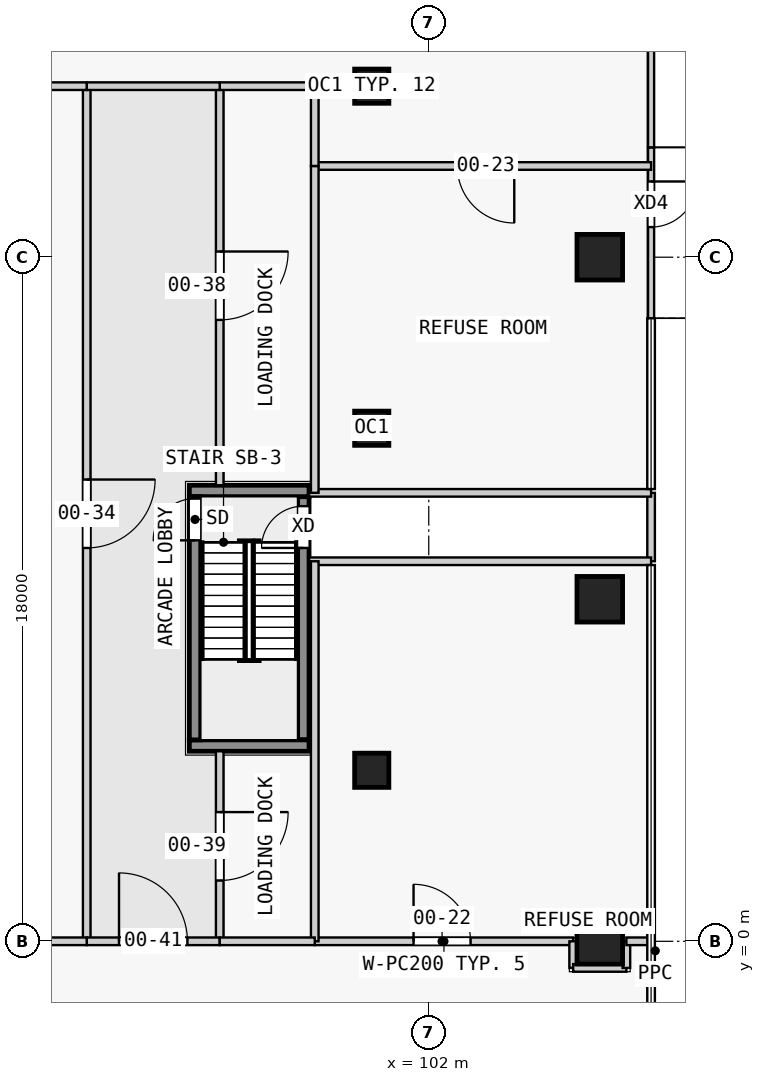
"""IFC4 building model, lengths in metres.
Left out: names, types, materials, properties, quantities, classifications, styles, units other than length and angle.
Written with IfcOpenShell. Run it as: python <this file> out.ifc"""

import sys

from ifc_helpers import new_model, si_unit, direction, frame, frame_2d, origin, origin_2d, place, context, subcontext, project, spatial, rectangle, extrude, element, fill, save


model = new_model("IFC4")
c1 = context("Model", 3, precision=1e-05, world=origin(), true_north=direction((0.0, 1.0)))
c2 = subcontext(c1, "Body", "Model", "MODEL_VIEW")
j1 = project(units=[si_unit("LENGTHUNIT", "METRE"), si_unit("PLANEANGLEUNIT", "RADIAN")], contexts=[c1])
p1 = place(None, origin())
s1 = spatial("IfcSite", under=j1, at=p1, CompositionType="ELEMENT")
p2 = place(p1, origin())
s2 = spatial("IfcBuilding", under=s1, at=p2, CompositionType="ELEMENT")
p3 = place(p2, origin())
s3 = spatial("IfcBuildingStorey", under=s2, at=p3, CompositionType="ELEMENT", Elevation=0.0)
for number, where, z_axis, x_axis in (
    (1, (106.5, 0.0, 0.0), (0.0, 0.0, 1.0), (1.0, 0.0, 0.0)),
    (2, (106.5, 9.0, 0.0), (0.0, 0.0, 1.0), (1.0, 0.0, 0.0)),
    (3, (106.5, 18.0, 0.0), (0.0, 0.0, 1.0), (1.0, 0.0, 0.0)),
):
    element("IfcColumn", number, at=place(p3, frame(where, z_axis=z_axis, x_axis=x_axis)), inside=s3, PredefinedType="COLUMN", context=c2, shape_type="SweptSolid", body=[
        extrude(rectangle(XDim=1.2, YDim=1.2, at=origin_2d()), origin(), (0.0, 0.0, 1.0), 8.0),
    ])
for number, where, z_axis, x_axis in (
    (4, (100.5, 4.5, 0.0), (0.0, 0.0, 1.0), (1.0, 0.0, 0.0)),
    (5, (100.5, 13.5, 0.0), (0.0, 0.0, 1.0), (1.0, 0.0, 0.0)),
    (6, (100.5, 22.5, 0.0), (0.0, 0.0, 1.0), (1.0, 0.0, 0.0)),
):
    element("IfcColumn", number, at=place(p3, frame(where, z_axis=z_axis, x_axis=x_axis)), inside=s3, PredefinedType="COLUMN", context=c2, shape_type="SweptSolid", body=[
        extrude(rectangle(XDim=0.9, YDim=0.9, at=origin_2d()), origin(), (0.0, 0.0, 1.0), 8.0),
    ])
p4 = place(p3, frame((95.85, 5.3, 0.0), z_axis=(0.0, 0.0, 1.0), x_axis=(0.0, 1.0, 0.0)))
e7 = element("IfcWall", 7, at=p4, inside=s3, PredefinedType="SHEAR", context=c2, shape_type="SweptSolid", body=[
    extrude(rectangle(XDim=6.4, YDim=0.3, at=frame_2d((3.2, 0.0))), origin(), (0.0, 0.0, 1.0), 7.65),
])
p5 = place(p4, frame((5.25, 0.0, 0.0)))
e8 = element("IfcOpeningElement", 8, at=p5, cuts=e7, PredefinedType="OPENING", context=c2, shape_type="SweptSolid", body=[
    extrude(rectangle(XDim=1.1, YDim=2.1, at=frame_2d((0.55, 1.05))), frame((0.0, 0.16, 0.0), z_axis=(0.0, -1.0, 0.0), x_axis=(1.0, 0.0, 0.0)), (0.0, 0.0, 1.0), 0.32),
])
p6 = place(p3, frame((98.7, 5.3, 0.0), z_axis=(0.0, 0.0, 1.0), x_axis=(0.0, 1.0, 0.0)))
e9 = element("IfcWall", 9, at=p6, inside=s3, PredefinedType="SHEAR", context=c2, shape_type="SweptSolid", body=[
    extrude(rectangle(XDim=6.4, YDim=0.3, at=frame_2d((3.2, 0.0))), origin(), (0.0, 0.0, 1.0), 7.65),
])
p7 = place(p6, frame((5.05, 0.0, 0.0)))
e10 = element("IfcOpeningElement", 10, at=p7, cuts=e9, PredefinedType="OPENING", context=c2, shape_type="SweptSolid", body=[
    extrude(rectangle(XDim=1.1, YDim=2.1, at=frame_2d((0.55, 1.05))), frame((0.0, 0.16, 0.0), z_axis=(0.0, -1.0, 0.0), x_axis=(1.0, 0.0, 0.0)), (0.0, 0.0, 1.0), 0.32),
])
for number, where, z_axis, x_axis in (
    (11, (95.7, 5.15, 0.0), (0.0, 0.0, 1.0), (1.0, 0.0, 0.0)),
    (12, (95.7, 11.85, 0.0), (0.0, 0.0, 1.0), (1.0, 0.0, 0.0)),
):
    element("IfcWall", number, at=place(p3, frame(where, z_axis=z_axis, x_axis=x_axis)), inside=s3, PredefinedType="SHEAR", context=c2, shape_type="SweptSolid", body=[
        extrude(rectangle(XDim=3.15, YDim=0.3, at=frame_2d((1.575, 0.0))), origin(), (0.0, 0.0, 1.0), 7.65),
    ])
p8 = place(p3, frame((107.85, 34.375, 0.0), z_axis=(0.0, 0.0, 1.0), x_axis=(0.0, -1.0, 0.0)))
e13 = element("IfcWall", 13, at=p8, inside=s3, PredefinedType="STANDARD", context=c2, shape_type="SweptSolid", body=[
    extrude(rectangle(XDim=13.485, YDim=0.16, at=frame_2d((6.743, 0.0))), origin(), (0.0, 0.0, 1.0), 7.65),
])
p9 = place(p8, frame((0.242, 0.0, 0.0)))
e14 = element("IfcOpeningElement", 14, at=p9, cuts=e13, PredefinedType="OPENING", context=c2, shape_type="SweptSolid", body=[
    extrude(rectangle(XDim=3.0, YDim=3.0, at=frame_2d((1.5, 1.5))), frame((0.0, 0.09, 0.0), z_axis=(0.0, -1.0, 0.0), x_axis=(1.0, 0.0, 0.0)), (0.0, 0.0, 1.0), 0.18),
])
p10 = place(p8, frame((3.242, 0.0, 0.0)))
e15 = element("IfcOpeningElement", 15, at=p10, cuts=e13, PredefinedType="OPENING", context=c2, shape_type="SweptSolid", body=[
    extrude(rectangle(XDim=3.0, YDim=3.0, at=frame_2d((1.5, 1.5))), frame((0.0, 0.09, 0.0), z_axis=(0.0, -1.0, 0.0), x_axis=(1.0, 0.0, 0.0)), (0.0, 0.0, 1.0), 0.18),
])
p11 = place(p8, frame((8.375, 0.0, 0.0)))
e16 = element("IfcOpeningElement", 16, at=p11, cuts=e13, PredefinedType="OPENING", context=c2, shape_type="SweptSolid", body=[
    extrude(rectangle(XDim=1.2, YDim=2.4, at=frame_2d((0.6, 1.2))), frame((0.0, 0.09, 0.0), z_axis=(0.0, -1.0, 0.0), x_axis=(1.0, 0.0, 0.0)), (0.0, 0.0, 1.0), 0.18),
])
p12 = place(p3, frame((107.85, 20.89, 0.0), z_axis=(0.0, 0.0, 1.0), x_axis=(0.0, -1.0, 0.0)))
e17 = element("IfcWall", 17, at=p12, inside=s3, PredefinedType="STANDARD", context=c2, shape_type="SweptSolid", body=[
    extrude(rectangle(XDim=4.495, YDim=0.16, at=frame_2d((2.248, 0.0))), origin(), (0.0, 0.0, 1.0), 7.65),
])
p13 = place(p12, frame((0.897, 0.0, 0.0)))
e18 = element("IfcOpeningElement", 18, at=p13, cuts=e17, PredefinedType="OPENING", context=c2, shape_type="SweptSolid", body=[
    extrude(rectangle(XDim=1.2, YDim=2.4, at=frame_2d((0.6, 1.2))), frame((0.0, 0.09, 0.0), z_axis=(0.0, -1.0, 0.0), x_axis=(1.0, 0.0, 0.0)), (0.0, 0.0, 1.0), 0.18),
])
for number, where, z_axis, x_axis in (
    (19, (98.85, 10.0, 0.0), (0.0, 0.0, 1.0), (1.0, 0.0, 0.0)),
    (20, (98.85, 11.8, 0.0), (0.0, 0.0, 1.0), (1.0, 0.0, 0.0)),
):
    element("IfcWall", number, at=place(p3, frame(where, z_axis=z_axis, x_axis=x_axis)), inside=s3, PredefinedType="PARTITIONING", context=c2, shape_type="SweptSolid", body=[
        extrude(rectangle(XDim=9.0, YDim=0.2, at=frame_2d((4.5, 0.0))), origin(), (0.0, 0.0, 1.0), 7.65),
    ])
p14 = place(p3, frame((107.85, 10.0, 0.0), z_axis=(0.0, 0.0, 1.0), x_axis=(0.0, 1.0, 0.0)))
e21 = element("IfcWall", 21, at=p14, inside=s3, PredefinedType="PARTITIONING", context=c2, shape_type="SweptSolid", body=[
    extrude(rectangle(XDim=1.8, YDim=0.2, at=frame_2d((0.9, 0.0))), origin(), (0.0, 0.0, 1.0), 7.65),
])
p15 = place(p3, frame((93.0, 22.5, 0.0), z_axis=(0.0, 0.0, 1.0), x_axis=(0.0, -1.0, 0.0)))
e22 = element("IfcWall", 22, at=p15, inside=s3, PredefinedType="PARTITIONING", context=c2, shape_type="SweptSolid", body=[
    extrude(rectangle(XDim=22.5, YDim=0.2, at=frame_2d((11.25, 0.0))), origin(), (0.0, 0.0, 1.0), 7.65),
])
p16 = place(p15, frame((10.35, 0.0, 0.0)))
e23 = element("IfcOpeningElement", 23, at=p16, cuts=e22, PredefinedType="OPENING", context=c2, shape_type="SweptSolid", body=[
    extrude(rectangle(XDim=1.8, YDim=2.1, at=frame_2d((0.9, 1.05))), frame((0.0, 0.11, 0.0), z_axis=(0.0, -1.0, 0.0), x_axis=(1.0, 0.0, 0.0)), (0.0, 0.0, 1.0), 0.22),
])
p17 = place(p3, frame((96.5, 22.5, 0.0), z_axis=(0.0, 0.0, 1.0), x_axis=(0.0, -1.0, 0.0)))
e24 = element("IfcWall", 24, at=p17, inside=s3, PredefinedType="PARTITIONING", context=c2, shape_type="SweptSolid", body=[
    extrude(rectangle(XDim=10.5, YDim=0.2, at=frame_2d((5.25, 0.0))), origin(), (0.0, 0.0, 1.0), 7.65),
])
p18 = place(p17, frame((4.35, 0.0, 0.0)))
e25 = element("IfcOpeningElement", 25, at=p18, cuts=e24, PredefinedType="OPENING", context=c2, shape_type="SweptSolid", body=[
    extrude(rectangle(XDim=1.8, YDim=2.1, at=frame_2d((0.9, 1.05))), frame((0.0, 0.11, 0.0), z_axis=(0.0, -1.0, 0.0), x_axis=(1.0, 0.0, 0.0)), (0.0, 0.0, 1.0), 0.22),
])
p19 = place(p3, frame((99.0, 0.0, 0.0), z_axis=(0.0, 0.0, 1.0), x_axis=(1.0, 0.0, 0.0)))
e26 = element("IfcWall", 26, at=p19, inside=s3, PredefinedType="PARTITIONING", context=c2, shape_type="SweptSolid", body=[
    extrude(rectangle(XDim=6.8, YDim=0.2, at=frame_2d((3.4, 0.0))), origin(), (0.0, 0.0, 1.0), 7.65),
])
p20 = place(p19, frame((2.6, 0.0, 0.0)))
e27 = element("IfcOpeningElement", 27, at=p20, cuts=e26, PredefinedType="OPENING", context=c2, shape_type="SweptSolid", body=[
    extrude(rectangle(XDim=1.5, YDim=2.1, at=frame_2d((0.75, 1.05))), frame((0.0, 0.11, 0.0), z_axis=(0.0, -1.0, 0.0), x_axis=(1.0, 0.0, 0.0)), (0.0, 0.0, 1.0), 0.22),
])
p21 = place(p3, frame((105.8, 0.0, 0.0), z_axis=(0.0, 0.0, 1.0), x_axis=(0.0, -1.0, 0.0)))
e28 = element("IfcWall", 28, at=p21, inside=s3, PredefinedType="PARTITIONING", context=c2, shape_type="SweptSolid", body=[
    extrude(rectangle(XDim=0.7, YDim=0.2, at=frame_2d((0.35, 0.0))), origin(), (0.0, 0.0, 1.0), 7.65),
])
p22 = place(p3, frame((105.8, -0.7, 0.0), z_axis=(0.0, 0.0, 1.0), x_axis=(1.0, 0.0, 0.0)))
e29 = element("IfcWall", 29, at=p22, inside=s3, PredefinedType="PARTITIONING", context=c2, shape_type="SweptSolid", body=[
    extrude(rectangle(XDim=1.4, YDim=0.2, at=frame_2d((0.7, 0.0))), origin(), (0.0, 0.0, 1.0), 6.95),
])
p23 = place(p3, frame((107.2, -0.7, 0.0), z_axis=(0.0, 0.0, 1.0), x_axis=(0.0, 1.0, 0.0)))
e30 = element("IfcWall", 30, at=p23, inside=s3, PredefinedType="PARTITIONING", context=c2, shape_type="SweptSolid", body=[
    extrude(rectangle(XDim=0.7, YDim=0.2, at=frame_2d((0.35, 0.0))), origin(), (0.0, 0.0, 1.0), 7.65),
])
p24 = place(p3, frame((107.2, 0.0, 0.0), z_axis=(0.0, 0.0, 1.0), x_axis=(1.0, 0.0, 0.0)))
e31 = element("IfcWall", 31, at=p24, inside=s3, PredefinedType="PARTITIONING", context=c2, shape_type="SweptSolid", body=[
    extrude(rectangle(XDim=0.65, YDim=0.2, at=frame_2d((0.325, 0.0))), origin(), (0.0, 0.0, 1.0), 7.65),
])
p25 = place(p3, frame((99.0, 10.0, 0.0), z_axis=(0.0, 0.0, 1.0), x_axis=(0.0, -1.0, 0.0)))
e32 = element("IfcWall", 32, at=p25, inside=s3, PredefinedType="PARTITIONING", context=c2, shape_type="SweptSolid", body=[
    extrude(rectangle(XDim=10.0, YDim=0.2, at=frame_2d((5.0, 0.0))), origin(), (0.0, 0.0, 1.0), 7.65),
])
p26 = place(p3, frame((107.85, 20.4, 0.0), z_axis=(0.0, 0.0, 1.0), x_axis=(-1.0, 0.0, 0.0)))
e33 = element("IfcWall", 33, at=p26, inside=s3, PredefinedType="PARTITIONING", context=c2, shape_type="SweptSolid", body=[
    extrude(rectangle(XDim=8.85, YDim=0.2, at=frame_2d((4.425, 0.0))), origin(), (0.0, 0.0, 1.0), 6.95),
])
p27 = place(p26, frame((3.6, 0.0, 0.0)))
e34 = element("IfcOpeningElement", 34, at=p27, cuts=e33, PredefinedType="OPENING", context=c2, shape_type="SweptSolid", body=[
    extrude(rectangle(XDim=1.5, YDim=2.1, at=frame_2d((0.75, 1.05))), frame((0.0, 0.11, 0.0), z_axis=(0.0, -1.0, 0.0), x_axis=(1.0, 0.0, 0.0)), (0.0, 0.0, 1.0), 0.22),
])
p28 = place(p3, frame((99.0, 20.4, 0.0), z_axis=(0.0, 0.0, 1.0), x_axis=(0.0, -1.0, 0.0)))
e35 = element("IfcWall", 35, at=p28, inside=s3, PredefinedType="PARTITIONING", context=c2, shape_type="SweptSolid", body=[
    extrude(rectangle(XDim=8.6, YDim=0.2, at=frame_2d((4.3, 0.0))), origin(), (0.0, 0.0, 1.0), 7.65),
])
p29 = place(p3, frame((96.5, 5.0, 0.0), z_axis=(0.0, 0.0, 1.0), x_axis=(0.0, -1.0, 0.0)))
e36 = element("IfcWall", 36, at=p29, inside=s3, PredefinedType="PARTITIONING", context=c2, shape_type="SweptSolid", body=[
    extrude(rectangle(XDim=5.0, YDim=0.2, at=frame_2d((2.5, 0.0))), origin(), (0.0, 0.0, 1.0), 7.65),
])
p30 = place(p29, frame((1.6, 0.0, 0.0)))
e37 = element("IfcOpeningElement", 37, at=p30, cuts=e36, PredefinedType="OPENING", context=c2, shape_type="SweptSolid", body=[
    extrude(rectangle(XDim=1.8, YDim=2.1, at=frame_2d((0.9, 1.05))), frame((0.0, 0.11, 0.0), z_axis=(0.0, -1.0, 0.0), x_axis=(1.0, 0.0, 0.0)), (0.0, 0.0, 1.0), 0.22),
])
p31 = place(p3, frame((99.0, 20.4, 0.0), z_axis=(0.0, 0.0, 1.0), x_axis=(0.0, 1.0, 0.0)))
e38 = element("IfcWall", 38, at=p31, inside=s3, PredefinedType="PARTITIONING", context=c2, shape_type="SweptSolid", body=[
    extrude(rectangle(XDim=2.1, YDim=0.2, at=frame_2d((1.05, 0.0))), origin(), (0.0, 0.0, 1.0), 7.65),
])
p32 = place(p3, frame((99.0, 22.5, 0.0), z_axis=(0.0, 0.0, 1.0), x_axis=(-1.0, 0.0, 0.0)))
e39 = element("IfcWall", 39, at=p32, inside=s3, PredefinedType="PARTITIONING", context=c2, shape_type="SweptSolid", body=[
    extrude(rectangle(XDim=2.5, YDim=0.2, at=frame_2d((1.25, 0.0))), origin(), (0.0, 0.0, 1.0), 7.65),
])
p33 = place(p3, frame((96.5, 22.5, 0.0), z_axis=(0.0, 0.0, 1.0), x_axis=(-1.0, 0.0, 0.0)))
e40 = element("IfcWall", 40, at=p33, inside=s3, PredefinedType="PARTITIONING", context=c2, shape_type="SweptSolid", body=[
    extrude(rectangle(XDim=3.5, YDim=0.2, at=frame_2d((1.75, 0.0))), origin(), (0.0, 0.0, 1.0), 7.65),
])
p34 = place(p3, frame((93.0, 0.0, 0.0), z_axis=(0.0, 0.0, 1.0), x_axis=(1.0, 0.0, 0.0)))
e41 = element("IfcWall", 41, at=p34, inside=s3, PredefinedType="PARTITIONING", context=c2, shape_type="SweptSolid", body=[
    extrude(rectangle(XDim=3.5, YDim=0.2, at=frame_2d((1.75, 0.0))), origin(), (0.0, 0.0, 1.0), 7.65),
])
p35 = place(p34, frame((0.85, 0.0, 0.0)))
e42 = element("IfcOpeningElement", 42, at=p35, cuts=e41, PredefinedType="OPENING", context=c2, shape_type="SweptSolid", body=[
    extrude(rectangle(XDim=1.8, YDim=2.1, at=frame_2d((0.9, 1.05))), frame((0.0, 0.11, 0.0), z_axis=(0.0, -1.0, 0.0), x_axis=(1.0, 0.0, 0.0)), (0.0, 0.0, 1.0), 0.22),
])
p36 = place(p3, frame((89.5, 0.0, 0.0), z_axis=(0.0, 0.0, 1.0), x_axis=(1.0, 0.0, 0.0)))
e43 = element("IfcWall", 43, at=p36, inside=s3, PredefinedType="PARTITIONING", context=c2, shape_type="SweptSolid", body=[
    extrude(rectangle(XDim=3.5, YDim=0.2, at=frame_2d((1.75, 0.0))), origin(), (0.0, 0.0, 1.0), 7.65),
])
p37 = place(p3, frame((93.0, 22.5, 0.0), z_axis=(0.0, 0.0, 1.0), x_axis=(-1.0, 0.0, 0.0)))
e44 = element("IfcWall", 44, at=p37, inside=s3, PredefinedType="PARTITIONING", context=c2, shape_type="SweptSolid", body=[
    extrude(rectangle(XDim=1.05, YDim=0.2, at=frame_2d((0.525, 0.0))), origin(), (0.0, 0.0, 1.0), 7.65),
])
p38 = place(p3, frame((96.5, 0.0, 0.0), z_axis=(0.0, 0.0, 1.0), x_axis=(1.0, 0.0, 0.0)))
e45 = element("IfcWall", 45, at=p38, inside=s3, PredefinedType="PARTITIONING", context=c2, shape_type="SweptSolid", body=[
    extrude(rectangle(XDim=2.5, YDim=0.2, at=frame_2d((1.25, 0.0))), origin(), (0.0, 0.0, 1.0), 7.65),
])
p39 = place(p13, origin())
e46 = element("IfcDoor", 46, at=p39, inside=s3, OperationType="SINGLE_SWING_LEFT", PredefinedType="DOOR", context=c2, shape_type="SweptSolid", body=[
    extrude(rectangle(XDim=1.2, YDim=2.4, at=frame_2d((0.6, 1.2))), frame((0.0, 0.025, 0.0), z_axis=(0.0, -1.0, 0.0), x_axis=(1.0, 0.0, 0.0)), (0.0, 0.0, 1.0), 0.05),
])
fill(e18, e46)
p40 = place(p5, origin())
e47 = element("IfcDoor", 47, at=p40, inside=s3, OperationType="SINGLE_SWING_LEFT", PredefinedType="DOOR", context=c2, shape_type="SweptSolid", body=[
    extrude(rectangle(XDim=1.1, YDim=2.1, at=frame_2d((0.55, 1.05))), frame((0.0, 0.025, 0.0), z_axis=(0.0, -1.0, 0.0), x_axis=(1.0, 0.0, 0.0)), (0.0, 0.0, 1.0), 0.05),
])
fill(e8, e47)
p41 = place(p7, origin())
e48 = element("IfcDoor", 48, at=p41, inside=s3, OperationType="SINGLE_SWING_LEFT", PredefinedType="DOOR", context=c2, shape_type="SweptSolid", body=[
    extrude(rectangle(XDim=1.1, YDim=2.1, at=frame_2d((0.55, 1.05))), frame((0.0, 0.025, 0.0), z_axis=(0.0, -1.0, 0.0), x_axis=(1.0, 0.0, 0.0)), (0.0, 0.0, 1.0), 0.05),
])
fill(e10, e48)
p42 = place(p20, origin())
e49 = element("IfcDoor", 49, at=p42, inside=s3, OperationType="SINGLE_SWING_LEFT", PredefinedType="DOOR", context=c2, shape_type="SweptSolid", body=[
    extrude(rectangle(XDim=1.5, YDim=2.1, at=frame_2d((0.75, 1.05))), frame((0.0, 0.025, 0.0), z_axis=(0.0, -1.0, 0.0), x_axis=(1.0, 0.0, 0.0)), (0.0, 0.0, 1.0), 0.05),
])
fill(e27, e49)
p43 = place(p27, origin())
e50 = element("IfcDoor", 50, at=p43, inside=s3, OperationType="SINGLE_SWING_LEFT", PredefinedType="DOOR", context=c2, shape_type="SweptSolid", body=[
    extrude(rectangle(XDim=1.5, YDim=2.1, at=frame_2d((0.75, 1.05))), frame((0.0, 0.025, 0.0), z_axis=(0.0, -1.0, 0.0), x_axis=(1.0, 0.0, 0.0)), (0.0, 0.0, 1.0), 0.05),
])
fill(e34, e50)
p44 = place(p16, origin())
e51 = element("IfcDoor", 51, at=p44, inside=s3, OperationType="DOUBLE_DOOR_SINGLE_SWING", PredefinedType="DOOR", context=c2, shape_type="SweptSolid", body=[
    extrude(rectangle(XDim=1.8, YDim=2.1, at=frame_2d((0.9, 1.05))), frame((0.0, 0.025, 0.0), z_axis=(0.0, -1.0, 0.0), x_axis=(1.0, 0.0, 0.0)), (0.0, 0.0, 1.0), 0.05),
])
fill(e23, e51)
p45 = place(p18, origin())
e52 = element("IfcDoor", 52, at=p45, inside=s3, OperationType="DOUBLE_DOOR_SINGLE_SWING", PredefinedType="DOOR", context=c2, shape_type="SweptSolid", body=[
    extrude(rectangle(XDim=1.8, YDim=2.1, at=frame_2d((0.9, 1.05))), frame((0.0, 0.025, 0.0), z_axis=(0.0, -1.0, 0.0), x_axis=(1.0, 0.0, 0.0)), (0.0, 0.0, 1.0), 0.05),
])
fill(e25, e52)
p46 = place(p30, origin())
e53 = element("IfcDoor", 53, at=p46, inside=s3, OperationType="DOUBLE_DOOR_SINGLE_SWING", PredefinedType="DOOR", context=c2, shape_type="SweptSolid", body=[
    extrude(rectangle(XDim=1.8, YDim=2.1, at=frame_2d((0.9, 1.05))), frame((0.0, 0.025, 0.0), z_axis=(0.0, -1.0, 0.0), x_axis=(1.0, 0.0, 0.0)), (0.0, 0.0, 1.0), 0.05),
])
fill(e37, e53)
p47 = place(p35, origin())
e54 = element("IfcDoor", 54, at=p47, inside=s3, OperationType="DOUBLE_DOOR_SINGLE_SWING", PredefinedType="DOOR", context=c2, shape_type="SweptSolid", body=[
    extrude(rectangle(XDim=1.8, YDim=2.1, at=frame_2d((0.9, 1.05))), frame((0.0, 0.025, 0.0), z_axis=(0.0, -1.0, 0.0), x_axis=(1.0, 0.0, 0.0)), (0.0, 0.0, 1.0), 0.05),
])
fill(e42, e54)
save(model, sys.argv[1])
